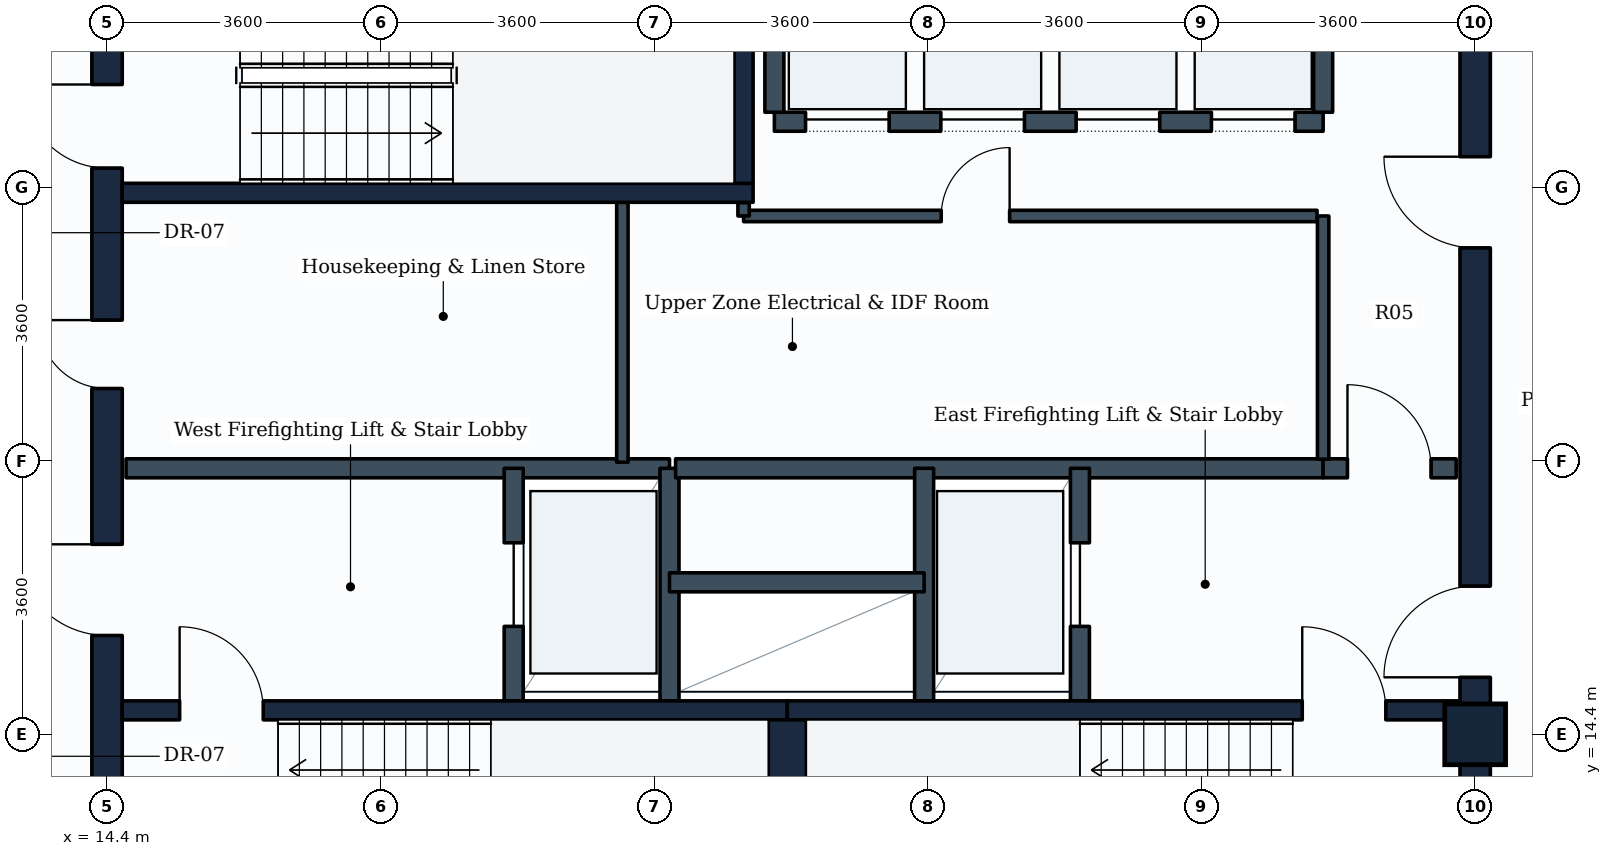
"""IFC4 building model, lengths in metres.
Left out: names, types, materials, properties, quantities, classifications, styles, units other than length and angle.
Written with IfcOpenShell. Run it as: python <this file> out.ifc"""

import sys

from ifc_helpers import new_model, si_unit, direction, frame, frame_2d, origin, origin_2d, place, context, subcontext, project, spatial, rectangle, extrude, element, fill, save


model = new_model("IFC4")
c1 = context("Model", 3, precision=1e-05, world=origin(), true_north=direction((0.0, 1.0)))
c2 = subcontext(c1, "Body", "Model", "MODEL_VIEW")
j1 = project(units=[si_unit("LENGTHUNIT", "METRE"), si_unit("PLANEANGLEUNIT", "RADIAN")], contexts=[c1])
p1 = place(None, origin())
s1 = spatial("IfcSite", under=j1, at=p1, CompositionType="ELEMENT")
p2 = place(p1, origin())
s2 = spatial("IfcBuilding", under=s1, at=p2, CompositionType="ELEMENT")
p3 = place(p2, frame((0.0, 0.0, 228.2)))
s3 = spatial("IfcBuildingStorey", under=s2, at=p3, CompositionType="ELEMENT", Elevation=228.2)
p4 = place(p3, frame((32.4, 14.4, 0.0), z_axis=(0.0, 0.0, 1.0), x_axis=(1.0, 0.0, 0.0)))
e1 = element("IfcColumn", 1, at=p4, inside=s3, PredefinedType="COLUMN", context=c2, shape_type="SweptSolid", body=[
    extrude(rectangle(XDim=0.8, YDim=0.8, at=origin_2d()), origin(), (0.0, 0.0, 1.0), 3.6),
])
p5 = place(p3, frame((14.4, 10.8, 0.0), z_axis=(0.0, 0.0, 1.0), x_axis=(0.0, 1.0, 0.0)))
e2 = element("IfcWall", 2, at=p5, inside=s3, PredefinedType="SHEAR", context=c2, shape_type="SweptSolid", body=[
    extrude(rectangle(XDim=14.4, YDim=0.4, at=frame_2d((7.2, 0.0))), origin(), (0.0, 0.0, 1.0), 3.35),
])
p6 = place(p5, frame((11.05, 0.0, 0.0)))
e3 = element("IfcOpeningElement", 3, at=p6, cuts=e2, PredefinedType="OPENING", context=c2, shape_type="SweptSolid", body=[
    extrude(rectangle(XDim=1.1, YDim=2.1, at=frame_2d((0.55, 1.05))), frame((0.0, 0.21, 0.0), z_axis=(0.0, -1.0, 0.0), x_axis=(1.0, 0.0, 0.0)), (0.0, 0.0, 1.0), 0.42),
])
p7 = place(p5, frame((4.9, 0.0, 0.0)))
e4 = element("IfcOpeningElement", 4, at=p7, cuts=e2, PredefinedType="OPENING", context=c2, shape_type="SweptSolid", body=[
    extrude(rectangle(XDim=1.2, YDim=2.1, at=frame_2d((0.6, 1.05))), frame((0.0, 0.21, 0.0), z_axis=(0.0, -1.0, 0.0), x_axis=(1.0, 0.0, 0.0)), (0.0, 0.0, 1.0), 0.42),
])
p8 = place(p5, frame((8.15, 0.0, 0.0)))
e5 = element("IfcOpeningElement", 5, at=p8, cuts=e2, PredefinedType="OPENING", context=c2, shape_type="SweptSolid", body=[
    extrude(rectangle(XDim=0.9, YDim=2.1, at=frame_2d((0.45, 1.05))), frame((0.0, 0.21, 0.0), z_axis=(0.0, -1.0, 0.0), x_axis=(1.0, 0.0, 0.0)), (0.0, 0.0, 1.0), 0.42),
])
p9 = place(p3, frame((32.4, 10.8, 0.0), z_axis=(0.0, 0.0, 1.0), x_axis=(0.0, 1.0, 0.0)))
e6 = element("IfcWall", 6, at=p9, inside=s3, PredefinedType="SHEAR", context=c2, shape_type="SweptSolid", body=[
    extrude(rectangle(XDim=14.4, YDim=0.4, at=frame_2d((7.2, 0.0))), origin(), (0.0, 0.0, 1.0), 3.35),
])
p10 = place(p9, frame((4.35, 0.0, 0.0)))
e7 = element("IfcOpeningElement", 7, at=p10, cuts=e6, PredefinedType="OPENING", context=c2, shape_type="SweptSolid", body=[
    extrude(rectangle(XDim=1.2, YDim=2.1, at=frame_2d((0.6, 1.05))), frame((0.0, 0.21, 0.0), z_axis=(0.0, -1.0, 0.0), x_axis=(1.0, 0.0, 0.0)), (0.0, 0.0, 1.0), 0.42),
])
p11 = place(p9, frame((10.0, 0.0, 0.0)))
e8 = element("IfcOpeningElement", 8, at=p11, cuts=e6, PredefinedType="OPENING", context=c2, shape_type="SweptSolid", body=[
    extrude(rectangle(XDim=1.2, YDim=2.1, at=frame_2d((0.6, 1.05))), frame((0.0, 0.21, 0.0), z_axis=(0.0, -1.0, 0.0), x_axis=(1.0, 0.0, 0.0)), (0.0, 0.0, 1.0), 0.42),
])
p12 = place(p3, frame((14.6, 14.715, 0.0), z_axis=(0.0, 0.0, 1.0), x_axis=(1.0, 0.0, 0.0)))
e9 = element("IfcWall", 9, at=p12, inside=s3, PredefinedType="SHEAR", context=c2, shape_type="SweptSolid", body=[
    extrude(rectangle(XDim=8.75, YDim=0.25, at=frame_2d((4.375, 0.0))), origin(), (0.0, 0.0, 1.0), 3.35),
])
p13 = place(p12, frame((0.755, 0.0, 0.0)))
e10 = element("IfcOpeningElement", 10, at=p13, cuts=e9, PredefinedType="OPENING", context=c2, shape_type="SweptSolid", body=[
    extrude(rectangle(XDim=1.1, YDim=2.1, at=frame_2d((0.55, 1.05))), frame((0.0, 0.135, 0.0), z_axis=(0.0, -1.0, 0.0), x_axis=(1.0, 0.0, 0.0)), (0.0, 0.0, 1.0), 0.27),
])
p14 = place(p3, frame((23.35, 14.715, 0.0), z_axis=(0.0, 0.0, 1.0), x_axis=(1.0, 0.0, 0.0)))
e11 = element("IfcWall", 11, at=p14, inside=s3, PredefinedType="SHEAR", context=c2, shape_type="SweptSolid", body=[
    extrude(rectangle(XDim=8.85, YDim=0.25, at=frame_2d((4.425, 0.0))), origin(), (0.0, 0.0, 1.0), 3.35),
])
p15 = place(p14, frame((6.775, 0.0, 0.0)))
e12 = element("IfcOpeningElement", 12, at=p15, cuts=e11, PredefinedType="OPENING", context=c2, shape_type="SweptSolid", body=[
    extrude(rectangle(XDim=1.1, YDim=2.1, at=frame_2d((0.55, 1.05))), frame((0.0, 0.135, 0.0), z_axis=(0.0, -1.0, 0.0), x_axis=(1.0, 0.0, 0.0)), (0.0, 0.0, 1.0), 0.27),
])
p16 = place(p3, frame((23.35, 11.75, 0.0), z_axis=(0.0, 0.0, 1.0), x_axis=(0.0, 1.0, 0.0)))
e13 = element("IfcWall", 13, at=p16, inside=s3, PredefinedType="SHEAR", context=c2, shape_type="SweptSolid", body=[
    extrude(rectangle(XDim=2.84, YDim=0.5, at=frame_2d((1.42, 0.0))), origin(), (0.0, 0.0, 1.0), 3.35),
])
p17 = place(p3, frame((14.6, 21.525, 0.0), z_axis=(0.0, 0.0, 1.0), x_axis=(1.0, 0.0, 0.0)))
e14 = element("IfcWall", 14, at=p17, inside=s3, PredefinedType="SHEAR", context=c2, shape_type="SweptSolid", body=[
    extrude(rectangle(XDim=8.3, YDim=0.25, at=frame_2d((4.15, 0.0))), origin(), (0.0, 0.0, 1.0), 3.35),
])
p18 = place(p3, frame((22.775, 21.65, 0.0), z_axis=(0.0, 0.0, 1.0), x_axis=(0.0, 1.0, 0.0)))
e15 = element("IfcWall", 15, at=p18, inside=s3, PredefinedType="SHEAR", context=c2, shape_type="SweptSolid", body=[
    extrude(rectangle(XDim=2.84, YDim=0.25, at=frame_2d((1.42, 0.0))), origin(), (0.0, 0.0, 1.0), 3.35),
])
p19 = place(p3, frame((14.65, 17.9, 0.0), z_axis=(0.0, 0.0, 1.0), x_axis=(1.0, 0.0, 0.0)))
e16 = element("IfcWall", 16, at=p19, inside=s3, PredefinedType="PARTITIONING", context=c2, shape_type="SweptSolid", body=[
    extrude(rectangle(XDim=7.15, YDim=0.25, at=frame_2d((3.575, 0.0))), origin(), (0.0, 0.0, 1.0), 3.335),
])
p20 = place(p3, frame((19.75, 14.84, 0.0), z_axis=(0.0, 0.0, 1.0), x_axis=(0.0, 1.0, 0.0)))
e17 = element("IfcWall", 17, at=p20, inside=s3, PredefinedType="PARTITIONING", context=c2, shape_type="SweptSolid", body=[
    extrude(rectangle(XDim=3.06, YDim=0.25, at=frame_2d((1.53, 0.0))), origin(), (0.0, 0.0, 1.0), 3.335),
])
p21 = place(p20, frame((0.98, 0.0, 0.0)))
e18 = element("IfcOpeningElement", 18, at=p21, cuts=e17, PredefinedType="OPENING", context=c2, shape_type="SweptSolid", body=[
    extrude(rectangle(XDim=1.1, YDim=2.1, at=frame_2d((0.55, 1.05))), frame((0.0, 0.135, 0.0), z_axis=(0.0, -1.0, 0.0), x_axis=(1.0, 0.0, 0.0)), (0.0, 0.0, 1.0), 0.27),
])
p22 = place(p3, frame((21.8, 14.84, 0.0), z_axis=(0.0, 0.0, 1.0), x_axis=(0.0, 1.0, 0.0)))
e19 = element("IfcWall", 19, at=p22, inside=s3, PredefinedType="PARTITIONING", context=c2, shape_type="SweptSolid", body=[
    extrude(rectangle(XDim=3.06, YDim=0.25, at=frame_2d((1.53, 0.0))), origin(), (0.0, 0.0, 1.0), 3.335),
])
p23 = place(p3, frame((21.88, 17.9, 0.0), z_axis=(0.0, 0.0, 1.0), x_axis=(1.0, 0.0, 0.0)))
e20 = element("IfcWall", 20, at=p23, inside=s3, PredefinedType="PARTITIONING", context=c2, shape_type="SweptSolid", body=[
    extrude(rectangle(XDim=8.52, YDim=0.25, at=frame_2d((4.26, 0.0))), origin(), (0.0, 0.0, 1.0), 3.335),
])
p24 = place(p3, frame((30.4, 17.9, 0.0), z_axis=(0.0, 0.0, 1.0), x_axis=(1.0, 0.0, 0.0)))
e21 = element("IfcWall", 21, at=p24, inside=s3, PredefinedType="PARTITIONING", context=c2, shape_type="SweptSolid", body=[
    extrude(rectangle(XDim=1.75, YDim=0.25, at=frame_2d((0.875, 0.0))), origin(), (0.0, 0.0, 1.0), 3.335),
])
p25 = place(p24, frame((0.32, 0.0, 0.0)))
e22 = element("IfcOpeningElement", 22, at=p25, cuts=e21, PredefinedType="OPENING", context=c2, shape_type="SweptSolid", body=[
    extrude(rectangle(XDim=1.1, YDim=2.1, at=frame_2d((0.55, 1.05))), frame((0.0, 0.135, 0.0), z_axis=(0.0, -1.0, 0.0), x_axis=(1.0, 0.0, 0.0)), (0.0, 0.0, 1.0), 0.27),
])
p26 = place(p3, frame((25.15, 14.84, 0.0), z_axis=(0.0, 0.0, 1.0), x_axis=(0.0, 1.0, 0.0)))
e23 = element("IfcWall", 23, at=p26, inside=s3, PredefinedType="PARTITIONING", context=c2, shape_type="SweptSolid", body=[
    extrude(rectangle(XDim=3.06, YDim=0.25, at=frame_2d((1.53, 0.0))), origin(), (0.0, 0.0, 1.0), 3.335),
])
p27 = place(p3, frame((27.2, 14.84, 0.0), z_axis=(0.0, 0.0, 1.0), x_axis=(0.0, 1.0, 0.0)))
e24 = element("IfcWall", 24, at=p27, inside=s3, PredefinedType="PARTITIONING", context=c2, shape_type="SweptSolid", body=[
    extrude(rectangle(XDim=3.06, YDim=0.25, at=frame_2d((1.53, 0.0))), origin(), (0.0, 0.0, 1.0), 3.335),
])
p28 = place(p27, frame((0.98, 0.0, 0.0)))
e25 = element("IfcOpeningElement", 25, at=p28, cuts=e24, PredefinedType="OPENING", context=c2, shape_type="SweptSolid", body=[
    extrude(rectangle(XDim=1.1, YDim=2.1, at=frame_2d((0.55, 1.05))), frame((0.0, 0.135, 0.0), z_axis=(0.0, -1.0, 0.0), x_axis=(1.0, 0.0, 0.0)), (0.0, 0.0, 1.0), 0.27),
])
p29 = place(p3, frame((21.8, 16.4, 0.0), z_axis=(0.0, 0.0, 1.0), x_axis=(1.0, 0.0, 0.0)))
e26 = element("IfcWall", 26, at=p29, inside=s3, PredefinedType="PARTITIONING", context=c2, shape_type="SweptSolid", body=[
    extrude(rectangle(XDim=3.35, YDim=0.25, at=frame_2d((1.675, 0.0))), origin(), (0.0, 0.0, 1.0), 3.335),
])
p30 = place(p3, frame((23.18, 22.46, 0.0), z_axis=(0.0, 0.0, 1.0), x_axis=(1.0, 0.0, 0.0)))
e27 = element("IfcWall", 27, at=p30, inside=s3, PredefinedType="PARTITIONING", context=c2, shape_type="SweptSolid", body=[
    extrude(rectangle(XDim=7.22, YDim=0.25, at=frame_2d((3.61, 0.0))), origin(), (0.0, 0.0, 1.0), 3.335),
])
p31 = place(p30, frame((0.41, 0.0, 0.0)))
e28 = element("IfcOpeningElement", 28, at=p31, cuts=e27, PredefinedType="OPENING", context=c2, shape_type="SweptSolid", body=[
    extrude(rectangle(XDim=1.1, YDim=2.1, at=frame_2d((0.55, 1.05))), frame((0.0, 0.135, 0.0), z_axis=(0.0, -1.0, 0.0), x_axis=(1.0, 0.0, 0.0)), (0.0, 0.0, 1.0), 0.27),
])
p32 = place(p30, frame((2.19, 0.0, 0.0)))
e29 = element("IfcOpeningElement", 29, at=p32, cuts=e27, PredefinedType="OPENING", context=c2, shape_type="SweptSolid", body=[
    extrude(rectangle(XDim=1.1, YDim=2.1, at=frame_2d((0.55, 1.05))), frame((0.0, 0.135, 0.0), z_axis=(0.0, -1.0, 0.0), x_axis=(1.0, 0.0, 0.0)), (0.0, 0.0, 1.0), 0.27),
])
p33 = place(p30, frame((3.97, 0.0, 0.0)))
e30 = element("IfcOpeningElement", 30, at=p33, cuts=e27, PredefinedType="OPENING", context=c2, shape_type="SweptSolid", body=[
    extrude(rectangle(XDim=1.1, YDim=2.1, at=frame_2d((0.55, 1.05))), frame((0.0, 0.135, 0.0), z_axis=(0.0, -1.0, 0.0), x_axis=(1.0, 0.0, 0.0)), (0.0, 0.0, 1.0), 0.27),
])
p34 = place(p30, frame((5.75, 0.0, 0.0)))
e31 = element("IfcOpeningElement", 31, at=p34, cuts=e27, PredefinedType="OPENING", context=c2, shape_type="SweptSolid", body=[
    extrude(rectangle(XDim=1.1, YDim=2.1, at=frame_2d((0.55, 1.05))), frame((0.0, 0.135, 0.0), z_axis=(0.0, -1.0, 0.0), x_axis=(1.0, 0.0, 0.0)), (0.0, 0.0, 1.0), 0.27),
])
for number, where, z_axis, x_axis in (
    (32, (23.18, 22.585, 0.0), (0.0, 0.0, 1.0), (0.0, 1.0, 0.0)),
    (33, (30.4, 22.585, 0.0), (0.0, 0.0, 1.0), (0.0, 1.0, 0.0)),
):
    element("IfcWall", number, at=place(p3, frame(where, z_axis=z_axis, x_axis=x_axis)), inside=s3, PredefinedType="PARTITIONING", context=c2, shape_type="SweptSolid", body=[
        extrude(rectangle(XDim=2.315, YDim=0.25, at=frame_2d((1.157, 0.0))), origin(), (0.0, 0.0, 1.0), 3.335),
    ])
p35 = place(p3, frame((22.775, 21.22, 0.0), z_axis=(0.0, 0.0, 1.0), x_axis=(1.0, 0.0, 0.0)))
e34 = element("IfcWall", 34, at=p35, inside=s3, PredefinedType="PARTITIONING", context=c2, shape_type="SweptSolid", body=[
    extrude(rectangle(XDim=7.545, YDim=0.15, at=frame_2d((3.772, 0.0))), origin(), (0.0, 0.0, 1.0), 3.335),
])
p36 = place(p35, frame((2.6, 0.0, 0.0)))
e35 = element("IfcOpeningElement", 35, at=p36, cuts=e34, PredefinedType="OPENING", context=c2, shape_type="SweptSolid", body=[
    extrude(rectangle(XDim=0.9, YDim=2.1, at=frame_2d((0.45, 1.05))), frame((0.0, 0.085, 0.0), z_axis=(0.0, -1.0, 0.0), x_axis=(1.0, 0.0, 0.0)), (0.0, 0.0, 1.0), 0.17),
])
p37 = place(p3, frame((22.775, 21.22, 0.0), z_axis=(0.0, 0.0, 1.0), x_axis=(0.0, 1.0, 0.0)))
e36 = element("IfcWall", 36, at=p37, inside=s3, PredefinedType="PARTITIONING", context=c2, shape_type="SweptSolid", body=[
    extrude(rectangle(XDim=0.175, YDim=0.15, at=frame_2d((0.087, 0.0))), origin(), (0.0, 0.0, 1.0), 3.335),
])
p38 = place(p3, frame((30.4, 18.02, 0.0), z_axis=(0.0, 0.0, 1.0), x_axis=(0.0, 1.0, 0.0)))
e37 = element("IfcWall", 37, at=p38, inside=s3, PredefinedType="PARTITIONING", context=c2, shape_type="SweptSolid", body=[
    extrude(rectangle(XDim=3.2, YDim=0.15, at=frame_2d((1.6, 0.0))), origin(), (0.0, 0.0, 1.0), 3.335),
])
p39 = place(p3, frame((21.18, 17.98, 0.0), z_axis=(0.0, 0.0, 1.0), x_axis=(0.0, 1.0, 0.0)))
e38 = element("IfcWall", 38, at=p39, inside=s3, PredefinedType="PARTITIONING", context=c2, shape_type="SweptSolid", body=[
    extrude(rectangle(XDim=3.42, YDim=0.15, at=frame_2d((1.71, 0.0))), origin(), (0.0, 0.0, 1.0), 3.335),
])
p40 = place(p13, origin())
e39 = element("IfcDoor", 39, at=p40, inside=s3, OperationType="SINGLE_SWING_LEFT", PredefinedType="DOOR", context=c2, shape_type="SweptSolid", body=[
    extrude(rectangle(XDim=1.1, YDim=2.1, at=frame_2d((0.55, 1.05))), frame((0.0, 0.025, 0.0), z_axis=(0.0, -1.0, 0.0), x_axis=(1.0, 0.0, 0.0)), (0.0, 0.0, 1.0), 0.05),
])
fill(e10, e39)
p41 = place(p15, origin())
e40 = element("IfcDoor", 40, at=p41, inside=s3, OperationType="SINGLE_SWING_LEFT", PredefinedType="DOOR", context=c2, shape_type="SweptSolid", body=[
    extrude(rectangle(XDim=1.1, YDim=2.1, at=frame_2d((0.55, 1.05))), frame((0.0, 0.025, 0.0), z_axis=(0.0, -1.0, 0.0), x_axis=(1.0, 0.0, 0.0)), (0.0, 0.0, 1.0), 0.05),
])
fill(e12, e40)
p42 = place(p6, origin())
e41 = element("IfcDoor", 41, at=p42, inside=s3, OperationType="SINGLE_SWING_RIGHT", PredefinedType="DOOR", context=c2, shape_type="SweptSolid", body=[
    extrude(rectangle(XDim=1.1, YDim=2.1, at=frame_2d((0.55, 1.05))), frame((0.0, 0.025, 0.0), z_axis=(0.0, -1.0, 0.0), x_axis=(1.0, 0.0, 0.0)), (0.0, 0.0, 1.0), 0.05),
])
fill(e3, e41)
p43 = place(p21, origin())
e42 = element("IfcDoor", 42, at=p43, inside=s3, OperationType="SLIDING_TO_LEFT", PredefinedType="DOOR", context=c2, shape_type="SweptSolid", body=[
    extrude(rectangle(XDim=1.1, YDim=2.1, at=frame_2d((0.55, 1.05))), frame((0.0, 0.025, 0.0), z_axis=(0.0, -1.0, 0.0), x_axis=(1.0, 0.0, 0.0)), (0.0, 0.0, 1.0), 0.05),
])
fill(e18, e42)
p44 = place(p28, origin())
e43 = element("IfcDoor", 43, at=p44, inside=s3, OperationType="SLIDING_TO_LEFT", PredefinedType="DOOR", context=c2, shape_type="SweptSolid", body=[
    extrude(rectangle(XDim=1.1, YDim=2.1, at=frame_2d((0.55, 1.05))), frame((0.0, 0.025, 0.0), z_axis=(0.0, -1.0, 0.0), x_axis=(1.0, 0.0, 0.0)), (0.0, 0.0, 1.0), 0.05),
])
fill(e25, e43)
p45 = place(p7, origin())
e44 = element("IfcDoor", 44, at=p45, inside=s3, OperationType="SINGLE_SWING_RIGHT", PredefinedType="DOOR", context=c2, shape_type="SweptSolid", body=[
    extrude(rectangle(XDim=1.2, YDim=2.1, at=frame_2d((0.6, 1.05))), frame((0.0, 0.025, 0.0), z_axis=(0.0, -1.0, 0.0), x_axis=(1.0, 0.0, 0.0)), (0.0, 0.0, 1.0), 0.05),
])
fill(e4, e44)
p46 = place(p10, origin())
e45 = element("IfcDoor", 45, at=p46, inside=s3, OperationType="SINGLE_SWING_LEFT", PredefinedType="DOOR", context=c2, shape_type="SweptSolid", body=[
    extrude(rectangle(XDim=1.2, YDim=2.1, at=frame_2d((0.6, 1.05))), frame((0.0, 0.025, 0.0), z_axis=(0.0, -1.0, 0.0), x_axis=(1.0, 0.0, 0.0)), (0.0, 0.0, 1.0), 0.05),
])
fill(e7, e45)
p47 = place(p25, origin())
e46 = element("IfcDoor", 46, at=p47, inside=s3, OperationType="SINGLE_SWING_LEFT", PredefinedType="DOOR", context=c2, shape_type="SweptSolid", body=[
    extrude(rectangle(XDim=1.1, YDim=2.1, at=frame_2d((0.55, 1.05))), frame((0.0, 0.025, 0.0), z_axis=(0.0, -1.0, 0.0), x_axis=(1.0, 0.0, 0.0)), (0.0, 0.0, 1.0), 0.05),
])
fill(e22, e46)
p48 = place(p31, origin())
e47 = element("IfcDoor", 47, at=p48, inside=s3, OperationType="SLIDING_TO_LEFT", PredefinedType="DOOR", context=c2, shape_type="SweptSolid", body=[
    extrude(rectangle(XDim=1.1, YDim=2.1, at=frame_2d((0.55, 1.05))), frame((0.0, 0.025, 0.0), z_axis=(0.0, -1.0, 0.0), x_axis=(1.0, 0.0, 0.0)), (0.0, 0.0, 1.0), 0.05),
])
fill(e28, e47)
p49 = place(p32, origin())
e48 = element("IfcDoor", 48, at=p49, inside=s3, OperationType="SLIDING_TO_LEFT", PredefinedType="DOOR", context=c2, shape_type="SweptSolid", body=[
    extrude(rectangle(XDim=1.1, YDim=2.1, at=frame_2d((0.55, 1.05))), frame((0.0, 0.025, 0.0), z_axis=(0.0, -1.0, 0.0), x_axis=(1.0, 0.0, 0.0)), (0.0, 0.0, 1.0), 0.05),
])
fill(e29, e48)
p50 = place(p33, origin())
e49 = element("IfcDoor", 49, at=p50, inside=s3, OperationType="SLIDING_TO_LEFT", PredefinedType="DOOR", context=c2, shape_type="SweptSolid", body=[
    extrude(rectangle(XDim=1.1, YDim=2.1, at=frame_2d((0.55, 1.05))), frame((0.0, 0.025, 0.0), z_axis=(0.0, -1.0, 0.0), x_axis=(1.0, 0.0, 0.0)), (0.0, 0.0, 1.0), 0.05),
])
fill(e30, e49)
p51 = place(p34, origin())
e50 = element("IfcDoor", 50, at=p51, inside=s3, OperationType="SLIDING_TO_LEFT", PredefinedType="DOOR", context=c2, shape_type="SweptSolid", body=[
    extrude(rectangle(XDim=1.1, YDim=2.1, at=frame_2d((0.55, 1.05))), frame((0.0, 0.025, 0.0), z_axis=(0.0, -1.0, 0.0), x_axis=(1.0, 0.0, 0.0)), (0.0, 0.0, 1.0), 0.05),
])
fill(e31, e50)
p52 = place(p11, origin())
e51 = element("IfcDoor", 51, at=p52, inside=s3, OperationType="SINGLE_SWING_RIGHT", PredefinedType="DOOR", context=c2, shape_type="SweptSolid", body=[
    extrude(rectangle(XDim=1.2, YDim=2.1, at=frame_2d((0.6, 1.05))), frame((0.0, 0.025, 0.0), z_axis=(0.0, -1.0, 0.0), x_axis=(1.0, 0.0, 0.0)), (0.0, 0.0, 1.0), 0.05),
])
fill(e8, e51)
p53 = place(p8, origin())
e52 = element("IfcDoor", 52, at=p53, inside=s3, OperationType="SINGLE_SWING_RIGHT", PredefinedType="DOOR", context=c2, shape_type="SweptSolid", body=[
    extrude(rectangle(XDim=0.9, YDim=2.1, at=frame_2d((0.45, 1.05))), frame((0.0, 0.025, 0.0), z_axis=(0.0, -1.0, 0.0), x_axis=(1.0, 0.0, 0.0)), (0.0, 0.0, 1.0), 0.05),
])
fill(e5, e52)
p54 = place(p36, origin())
e53 = element("IfcDoor", 53, at=p54, inside=s3, OperationType="SINGLE_SWING_RIGHT", PredefinedType="DOOR", context=c2, shape_type="SweptSolid", body=[
    extrude(rectangle(XDim=0.9, YDim=2.1, at=frame_2d((0.45, 1.05))), frame((0.0, 0.025, 0.0), z_axis=(0.0, -1.0, 0.0), x_axis=(1.0, 0.0, 0.0)), (0.0, 0.0, 1.0), 0.05),
])
fill(e35, e53)
save(model, sys.argv[1])
